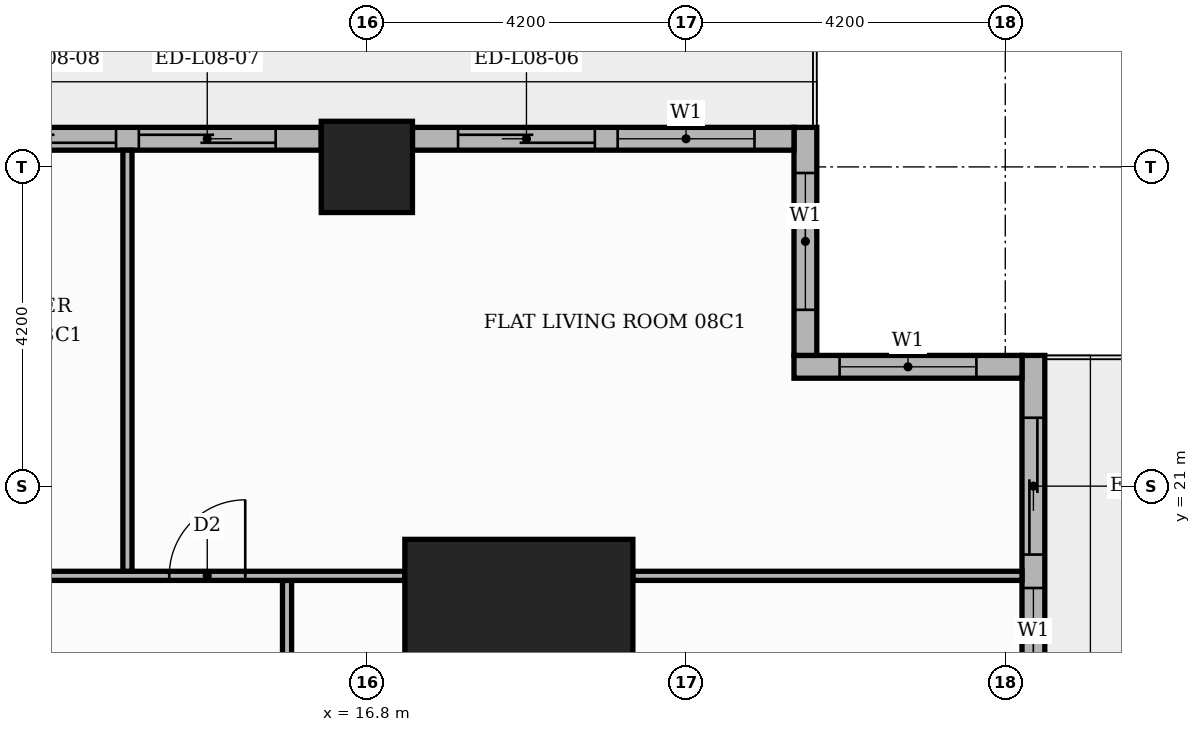
"""IFC4 building model, lengths in metres.
Left out: names, types, materials, properties, quantities, classifications, styles, units other than length and angle.
Written with IfcOpenShell. Run it as: python <this file> out.ifc"""

import sys

from ifc_helpers import new_model, si_unit, direction, frame, frame_2d, origin, origin_2d, place, context, subcontext, project, spatial, rectangle, extrude, element, fill, save


model = new_model("IFC4")
c1 = context("Model", 3, precision=1e-05, world=origin(), true_north=direction((0.0, 1.0)))
c2 = subcontext(c1, "Body", "Model", "MODEL_VIEW")
j1 = project(units=[si_unit("LENGTHUNIT", "METRE"), si_unit("PLANEANGLEUNIT", "RADIAN")], contexts=[c1])
p1 = place(None, origin())
s1 = spatial("IfcSite", under=j1, at=p1, CompositionType="ELEMENT")
p2 = place(p1, origin())
s2 = spatial("IfcBuilding", under=s1, at=p2, CompositionType="ELEMENT")
p3 = place(p2, frame((0.0, 0.0, 38.7)))
s3 = spatial("IfcBuildingStorey", under=s2, at=p3, CompositionType="ELEMENT", Elevation=38.7)
p4 = place(p3, frame((18.8, 18.8, 0.0), z_axis=(0.0, 0.0, 1.0), x_axis=(1.0, 0.0, 0.0)))
e1 = element("IfcColumn", 1, at=p4, inside=s3, PredefinedType="COLUMN", context=c2, shape_type="SweptSolid", body=[
    extrude(rectangle(XDim=3.0, YDim=3.0, at=origin_2d()), origin(), (0.0, 0.0, 1.0), 3.9),
])
p5 = place(p3, frame((16.8, 25.2, 0.0), z_axis=(0.0, 0.0, 1.0), x_axis=(1.0, 0.0, 0.0)))
e2 = element("IfcColumn", 2, at=p5, inside=s3, PredefinedType="COLUMN", context=c2, shape_type="SweptSolid", body=[
    extrude(rectangle(XDim=1.2, YDim=1.2, at=origin_2d()), origin(), (0.0, 0.0, 1.0), 3.9),
])
p6 = place(p3, frame((25.57, 17.4, 0.0), z_axis=(0.0, 0.0, 1.0), x_axis=(0.0, 1.0, 0.0)))
e3 = element("IfcWall", 3, at=p6, inside=s3, PredefinedType="STANDARD", context=c2, shape_type="SweptSolid", body=[
    extrude(rectangle(XDim=5.32, YDim=0.3, at=frame_2d((2.66, 0.0))), origin(), (0.0, 0.0, 1.0), 3.48),
])
p7 = place(p6, frame((2.7, 0.0, 0.0)))
e4 = element("IfcOpeningElement", 4, at=p7, cuts=e3, PredefinedType="OPENING", context=c2, shape_type="SweptSolid", body=[
    extrude(rectangle(XDim=1.8, YDim=2.4, at=frame_2d((0.9, 1.2))), frame((0.0, 0.16, 0.0), z_axis=(0.0, -1.0, 0.0), x_axis=(1.0, 0.0, 0.0)), (0.0, 0.0, 1.0), 0.32),
])
p8 = place(p6, frame((0.46, 0.0, 0.9)))
e5 = element("IfcOpeningElement", 5, at=p8, cuts=e3, PredefinedType="OPENING", context=c2, shape_type="SweptSolid", body=[
    extrude(rectangle(XDim=1.8, YDim=2.1, at=frame_2d((0.9, 1.05))), frame((0.0, 0.16, 0.0), z_axis=(0.0, -1.0, 0.0), x_axis=(1.0, 0.0, 0.0)), (0.0, 0.0, 1.0), 0.32),
])
p9 = place(p3, frame((25.42, 22.57, 0.0), z_axis=(0.0, 0.0, 1.0), x_axis=(-1.0, 0.0, 0.0)))
e6 = element("IfcWall", 6, at=p9, inside=s3, PredefinedType="STANDARD", context=c2, shape_type="SweptSolid", body=[
    extrude(rectangle(XDim=3.0, YDim=0.3, at=frame_2d((1.5, 0.0))), origin(), (0.0, 0.0, 1.0), 3.48),
])
p10 = place(p9, frame((0.6, 0.0, 0.9)))
e7 = element("IfcOpeningElement", 7, at=p10, cuts=e6, PredefinedType="OPENING", context=c2, shape_type="SweptSolid", body=[
    extrude(rectangle(XDim=1.8, YDim=2.1, at=frame_2d((0.9, 1.05))), frame((0.0, 0.16, 0.0), z_axis=(0.0, -1.0, 0.0), x_axis=(1.0, 0.0, 0.0)), (0.0, 0.0, 1.0), 0.32),
])
p11 = place(p3, frame((22.57, 22.72, 0.0), z_axis=(0.0, 0.0, 1.0), x_axis=(0.0, 1.0, 0.0)))
e8 = element("IfcWall", 8, at=p11, inside=s3, PredefinedType="STANDARD", context=c2, shape_type="SweptSolid", body=[
    extrude(rectangle(XDim=3.0, YDim=0.3, at=frame_2d((1.5, 0.0))), origin(), (0.0, 0.0, 1.0), 3.48),
])
p12 = place(p11, frame((0.6, 0.0, 0.9)))
e9 = element("IfcOpeningElement", 9, at=p12, cuts=e8, PredefinedType="OPENING", context=c2, shape_type="SweptSolid", body=[
    extrude(rectangle(XDim=1.8, YDim=2.1, at=frame_2d((0.9, 1.05))), frame((0.0, 0.16, 0.0), z_axis=(0.0, -1.0, 0.0), x_axis=(1.0, 0.0, 0.0)), (0.0, 0.0, 1.0), 0.32),
])
p13 = place(p3, frame((22.42, 25.57, 0.0), z_axis=(0.0, 0.0, 1.0), x_axis=(-1.0, 0.0, 0.0)))
e10 = element("IfcWall", 10, at=p13, inside=s3, PredefinedType="STANDARD", context=c2, shape_type="SweptSolid", body=[
    extrude(rectangle(XDim=5.02, YDim=0.3, at=frame_2d((2.51, 0.0))), origin(), (0.0, 0.0, 1.0), 3.48),
])
p14 = place(p13, frame((0.52, 0.0, 0.9)))
e11 = element("IfcOpeningElement", 11, at=p14, cuts=e10, PredefinedType="OPENING", context=c2, shape_type="SweptSolid", body=[
    extrude(rectangle(XDim=1.8, YDim=2.1, at=frame_2d((0.9, 1.05))), frame((0.0, 0.16, 0.0), z_axis=(0.0, -1.0, 0.0), x_axis=(1.0, 0.0, 0.0)), (0.0, 0.0, 1.0), 0.32),
])
p15 = place(p13, frame((2.62, 0.0, 0.0)))
e12 = element("IfcOpeningElement", 12, at=p15, cuts=e10, PredefinedType="OPENING", context=c2, shape_type="SweptSolid", body=[
    extrude(rectangle(XDim=1.8, YDim=2.4, at=frame_2d((0.9, 1.2))), frame((0.0, 0.16, 0.0), z_axis=(0.0, -1.0, 0.0), x_axis=(1.0, 0.0, 0.0)), (0.0, 0.0, 1.0), 0.32),
])
p16 = place(p3, frame((16.2, 25.57, 0.0), z_axis=(0.0, 0.0, 1.0), x_axis=(-1.0, 0.0, 0.0)))
e13 = element("IfcWall", 13, at=p16, inside=s3, PredefinedType="STANDARD", context=c2, shape_type="SweptSolid", body=[
    extrude(rectangle(XDim=7.2, YDim=0.3, at=frame_2d((3.6, 0.0))), origin(), (0.0, 0.0, 1.0), 3.48),
])
p17 = place(p16, frame((0.6, 0.0, 0.0)))
e14 = element("IfcOpeningElement", 14, at=p17, cuts=e13, PredefinedType="OPENING", context=c2, shape_type="SweptSolid", body=[
    extrude(rectangle(XDim=1.8, YDim=2.4, at=frame_2d((0.9, 1.2))), frame((0.0, 0.16, 0.0), z_axis=(0.0, -1.0, 0.0), x_axis=(1.0, 0.0, 0.0)), (0.0, 0.0, 1.0), 0.32),
])
p18 = place(p16, frame((2.7, 0.0, 0.0)))
e15 = element("IfcOpeningElement", 15, at=p18, cuts=e13, PredefinedType="OPENING", context=c2, shape_type="SweptSolid", body=[
    extrude(rectangle(XDim=1.8, YDim=2.4, at=frame_2d((0.9, 1.2))), frame((0.0, 0.16, 0.0), z_axis=(0.0, -1.0, 0.0), x_axis=(1.0, 0.0, 0.0)), (0.0, 0.0, 1.0), 0.32),
])
p19 = place(p16, frame((4.8, 0.0, 0.9)))
e16 = element("IfcOpeningElement", 16, at=p19, cuts=e13, PredefinedType="OPENING", context=c2, shape_type="SweptSolid", body=[
    extrude(rectangle(XDim=1.8, YDim=2.1, at=frame_2d((0.9, 1.05))), frame((0.0, 0.16, 0.0), z_axis=(0.0, -1.0, 0.0), x_axis=(1.0, 0.0, 0.0)), (0.0, 0.0, 1.0), 0.32),
])
p20 = place(p3, frame((15.75, 13.75, 0.0), z_axis=(0.0, 0.0, 1.0), x_axis=(0.0, 1.0, 0.0)))
e17 = element("IfcWall", 17, at=p20, inside=s3, PredefinedType="PARTITIONING", context=c2, shape_type="SweptSolid", body=[
    extrude(rectangle(XDim=6.01, YDim=0.12, at=frame_2d((3.005, 0.0))), origin(), (0.0, 0.0, 1.0), 3.48),
])
p21 = place(p20, frame((2.485, 0.0, 0.0)))
e18 = element("IfcOpeningElement", 18, at=p21, cuts=e17, PredefinedType="OPENING", context=c2, shape_type="SweptSolid", body=[
    extrude(rectangle(XDim=1.0, YDim=2.1, at=frame_2d((0.5, 1.05))), frame((0.0, 0.07, 0.0), z_axis=(0.0, -1.0, 0.0), x_axis=(1.0, 0.0, 0.0)), (0.0, 0.0, 1.0), 0.14),
])
p22 = place(p3, frame((5.35, 19.82, 0.0), z_axis=(0.0, 0.0, 1.0), x_axis=(1.0, 0.0, 0.0)))
e19 = element("IfcWall", 19, at=p22, inside=s3, PredefinedType="PARTITIONING", context=c2, shape_type="SweptSolid", body=[
    extrude(rectangle(XDim=11.95, YDim=0.12, at=frame_2d((5.975, 0.0))), origin(), (0.0, 0.0, 1.0), 3.48),
])
p23 = place(p22, frame((8.85, 0.0, 0.0)))
e20 = element("IfcOpeningElement", 20, at=p23, cuts=e19, PredefinedType="OPENING", context=c2, shape_type="SweptSolid", body=[
    extrude(rectangle(XDim=1.0, YDim=2.1, at=frame_2d((0.5, 1.05))), frame((0.0, 0.07, 0.0), z_axis=(0.0, -1.0, 0.0), x_axis=(1.0, 0.0, 0.0)), (0.0, 0.0, 1.0), 0.14),
])
p24 = place(p22, frame((5.75, 0.0, 0.0)))
e21 = element("IfcOpeningElement", 21, at=p24, cuts=e19, PredefinedType="OPENING", context=c2, shape_type="SweptSolid", body=[
    extrude(rectangle(XDim=0.9, YDim=2.1, at=frame_2d((0.45, 1.05))), frame((0.0, 0.07, 0.0), z_axis=(0.0, -1.0, 0.0), x_axis=(1.0, 0.0, 0.0)), (0.0, 0.0, 1.0), 0.14),
])
p25 = place(p3, frame((20.3, 19.82, 0.0), z_axis=(0.0, 0.0, 1.0), x_axis=(1.0, 0.0, 0.0)))
e22 = element("IfcWall", 22, at=p25, inside=s3, PredefinedType="PARTITIONING", context=c2, shape_type="SweptSolid", body=[
    extrude(rectangle(XDim=5.12, YDim=0.12, at=frame_2d((2.56, 0.0))), origin(), (0.0, 0.0, 1.0), 3.48),
])
p26 = place(p3, frame((13.65, 19.88, 0.0), z_axis=(0.0, 0.0, 1.0), x_axis=(0.0, 1.0, 0.0)))
e23 = element("IfcWall", 23, at=p26, inside=s3, PredefinedType="PARTITIONING", context=c2, shape_type="SweptSolid", body=[
    extrude(rectangle(XDim=5.54, YDim=0.12, at=frame_2d((2.77, 0.0))), origin(), (0.0, 0.0, 1.0), 3.48),
])
p27 = place(p7, origin())
e24 = element("IfcDoor", 24, at=p27, inside=s3, OperationType="SLIDING_TO_LEFT", PredefinedType="DOOR", context=c2, shape_type="SweptSolid", body=[
    extrude(rectangle(XDim=1.8, YDim=2.4, at=frame_2d((0.9, 1.2))), frame((0.0, 0.025, 0.0), z_axis=(0.0, -1.0, 0.0), x_axis=(1.0, 0.0, 0.0)), (0.0, 0.0, 1.0), 0.05),
])
fill(e4, e24)
p28 = place(p8, origin())
e25 = element("IfcWindow", 25, at=p28, inside=s3, PartitioningType="SINGLE_PANEL", PredefinedType="WINDOW", context=c2, shape_type="SweptSolid", body=[
    extrude(rectangle(XDim=1.8, YDim=2.1, at=frame_2d((0.9, 1.05))), frame((0.0, 0.03, 0.0), z_axis=(0.0, -1.0, 0.0), x_axis=(1.0, 0.0, 0.0)), (0.0, 0.0, 1.0), 0.06),
])
fill(e5, e25)
p29 = place(p10, origin())
e26 = element("IfcWindow", 26, at=p29, inside=s3, PartitioningType="SINGLE_PANEL", PredefinedType="WINDOW", context=c2, shape_type="SweptSolid", body=[
    extrude(rectangle(XDim=1.8, YDim=2.1, at=frame_2d((0.9, 1.05))), frame((0.0, 0.03, 0.0), z_axis=(0.0, -1.0, 0.0), x_axis=(1.0, 0.0, 0.0)), (0.0, 0.0, 1.0), 0.06),
])
fill(e7, e26)
p30 = place(p12, origin())
e27 = element("IfcWindow", 27, at=p30, inside=s3, PartitioningType="SINGLE_PANEL", PredefinedType="WINDOW", context=c2, shape_type="SweptSolid", body=[
    extrude(rectangle(XDim=1.8, YDim=2.1, at=frame_2d((0.9, 1.05))), frame((0.0, 0.03, 0.0), z_axis=(0.0, -1.0, 0.0), x_axis=(1.0, 0.0, 0.0)), (0.0, 0.0, 1.0), 0.06),
])
fill(e9, e27)
p31 = place(p14, origin())
e28 = element("IfcWindow", 28, at=p31, inside=s3, PartitioningType="SINGLE_PANEL", PredefinedType="WINDOW", context=c2, shape_type="SweptSolid", body=[
    extrude(rectangle(XDim=1.8, YDim=2.1, at=frame_2d((0.9, 1.05))), frame((0.0, 0.03, 0.0), z_axis=(0.0, -1.0, 0.0), x_axis=(1.0, 0.0, 0.0)), (0.0, 0.0, 1.0), 0.06),
])
fill(e11, e28)
p32 = place(p15, origin())
e29 = element("IfcDoor", 29, at=p32, inside=s3, OperationType="SLIDING_TO_RIGHT", PredefinedType="DOOR", context=c2, shape_type="SweptSolid", body=[
    extrude(rectangle(XDim=1.8, YDim=2.4, at=frame_2d((0.9, 1.2))), frame((0.0, 0.025, 0.0), z_axis=(0.0, -1.0, 0.0), x_axis=(1.0, 0.0, 0.0)), (0.0, 0.0, 1.0), 0.05),
])
fill(e12, e29)
p33 = place(p17, origin())
e30 = element("IfcDoor", 30, at=p33, inside=s3, OperationType="SLIDING_TO_LEFT", PredefinedType="DOOR", context=c2, shape_type="SweptSolid", body=[
    extrude(rectangle(XDim=1.8, YDim=2.4, at=frame_2d((0.9, 1.2))), frame((0.0, 0.025, 0.0), z_axis=(0.0, -1.0, 0.0), x_axis=(1.0, 0.0, 0.0)), (0.0, 0.0, 1.0), 0.05),
])
fill(e14, e30)
p34 = place(p18, origin())
e31 = element("IfcDoor", 31, at=p34, inside=s3, OperationType="SLIDING_TO_RIGHT", PredefinedType="DOOR", context=c2, shape_type="SweptSolid", body=[
    extrude(rectangle(XDim=1.8, YDim=2.4, at=frame_2d((0.9, 1.2))), frame((0.0, 0.025, 0.0), z_axis=(0.0, -1.0, 0.0), x_axis=(1.0, 0.0, 0.0)), (0.0, 0.0, 1.0), 0.05),
])
fill(e15, e31)
p35 = place(p23, origin())
e32 = element("IfcDoor", 32, at=p35, inside=s3, OperationType="SINGLE_SWING_RIGHT", PredefinedType="DOOR", context=c2, shape_type="SweptSolid", body=[
    extrude(rectangle(XDim=1.0, YDim=2.1, at=frame_2d((0.5, 1.05))), frame((0.0, 0.025, 0.0), z_axis=(0.0, -1.0, 0.0), x_axis=(1.0, 0.0, 0.0)), (0.0, 0.0, 1.0), 0.05),
])
fill(e20, e32)
save(model, sys.argv[1])
